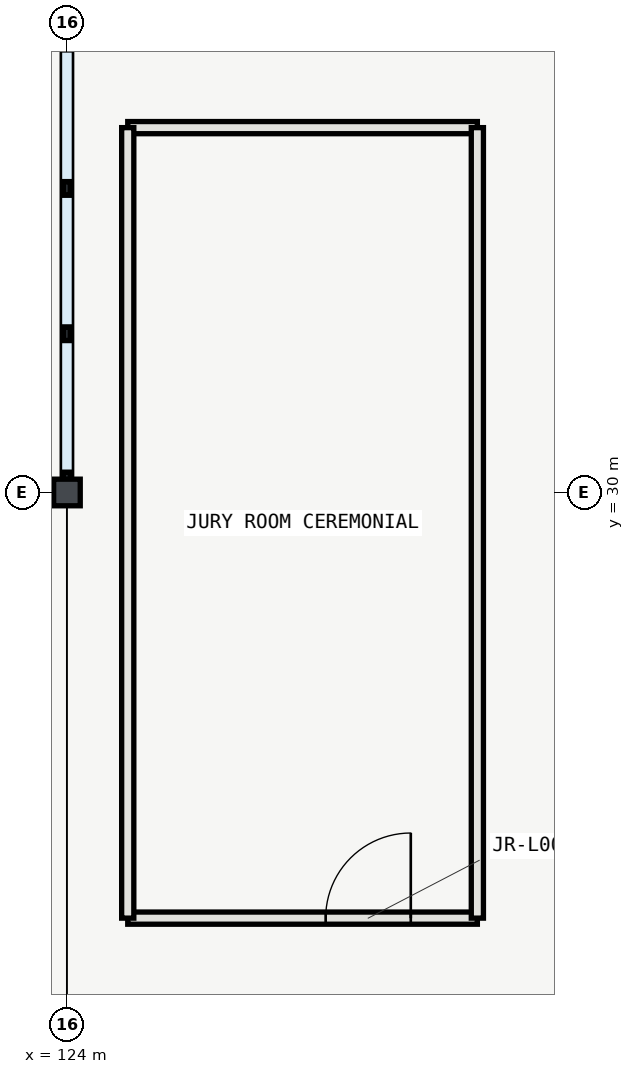
"""IFC4 building model, lengths in metres.
Left out: names, types, materials, properties, quantities, classifications, styles, units other than length and angle.
Written with IfcOpenShell. Run it as: python <this file> out.ifc"""

import sys

from ifc_helpers import new_model, si_unit, direction, frame, frame_2d, origin, origin_2d, place, context, subcontext, project, spatial, rectangle, i_section, extrude, element, fill, save


model = new_model("IFC4")
c1 = context("Model", 3, precision=1e-05, world=origin(), true_north=direction((0.0, 1.0)))
c2 = subcontext(c1, "Body", "Model", "MODEL_VIEW")
j1 = project(units=[si_unit("LENGTHUNIT", "METRE"), si_unit("PLANEANGLEUNIT", "RADIAN")], contexts=[c1])
p1 = place(None, origin())
s1 = spatial("IfcSite", under=j1, at=p1, CompositionType="ELEMENT")
p2 = place(p1, origin())
s2 = spatial("IfcBuilding", under=s1, at=p2, CompositionType="ELEMENT")
p3 = place(p2, origin())
s3 = spatial("IfcBuildingStorey", under=s2, at=p3, CompositionType="ELEMENT", Elevation=0.0)
p4 = place(p3, frame((124.0, 30.0, 0.0), z_axis=(0.0, 0.0, 1.0), x_axis=(1.0, 0.0, 0.0)))
e1 = element("IfcColumn", 1, at=p4, inside=s3, PredefinedType="COLUMN", context=c2, shape_type="SweptSolid", body=[
    extrude(i_section(OverallWidth=0.35, OverallDepth=0.35, WebThickness=0.012, FlangeThickness=0.019, FilletRadius=0.02, at=origin_2d()), origin(), (0.0, 0.0, 1.0), 5.4),
])
p5 = place(p3, frame((124.8, 24.4, 0.0), z_axis=(0.0, 0.0, 1.0), x_axis=(1.0, 0.0, 0.0)))
e2 = element("IfcWall", 2, at=p5, inside=s3, PredefinedType="PARTITIONING", context=c2, shape_type="SweptSolid", body=[
    extrude(rectangle(XDim=4.6, YDim=0.16, at=frame_2d((2.3, 0.0))), origin(), (0.0, 0.0, 1.0), 5.12),
])
p6 = place(p5, frame((2.604, 0.0, 0.0)))
e3 = element("IfcOpeningElement", 3, at=p6, cuts=e2, PredefinedType="OPENING", context=c2, shape_type="SweptSolid", body=[
    extrude(rectangle(XDim=1.12, YDim=2.2, at=frame_2d((0.56, 1.1))), frame((0.0, 0.09, 0.0), z_axis=(0.0, -1.0, 0.0), x_axis=(1.0, 0.0, 0.0)), (0.0, 0.0, 1.0), 0.18),
])
p7 = place(p3, frame((129.4, 34.8, 0.0), z_axis=(0.0, 0.0, 1.0), x_axis=(-1.0, 0.0, 0.0)))
e4 = element("IfcWall", 4, at=p7, inside=s3, PredefinedType="PARTITIONING", context=c2, shape_type="SweptSolid", body=[
    extrude(rectangle(XDim=4.6, YDim=0.16, at=frame_2d((2.3, 0.0))), origin(), (0.0, 0.0, 1.0), 5.12),
])
for number, where, z_axis, x_axis in (
    (5, (124.8, 34.8, 0.0), (0.0, 0.0, 1.0), (0.0, -1.0, 0.0)),
    (6, (129.4, 24.4, 0.0), (0.0, 0.0, 1.0), (0.0, 1.0, 0.0)),
):
    element("IfcWall", number, at=place(p3, frame(where, z_axis=z_axis, x_axis=x_axis)), inside=s3, PredefinedType="PARTITIONING", context=c2, shape_type="SweptSolid", body=[
        extrude(rectangle(XDim=10.4, YDim=0.16, at=frame_2d((5.2, 0.0))), origin(), (0.0, 0.0, 1.0), 5.12),
    ])
p8 = place(p6, origin())
e7 = element("IfcDoor", 7, at=p8, inside=s3, OperationType="SINGLE_SWING_RIGHT", PredefinedType="DOOR", context=c2, shape_type="SweptSolid", body=[
    extrude(rectangle(XDim=1.12, YDim=2.2, at=frame_2d((0.56, 1.1))), frame((0.0, 0.025, 0.0), z_axis=(0.0, -1.0, 0.0), x_axis=(1.0, 0.0, 0.0)), (0.0, 0.0, 1.0), 0.05),
])
fill(e3, e7)
save(model, sys.argv[1])
